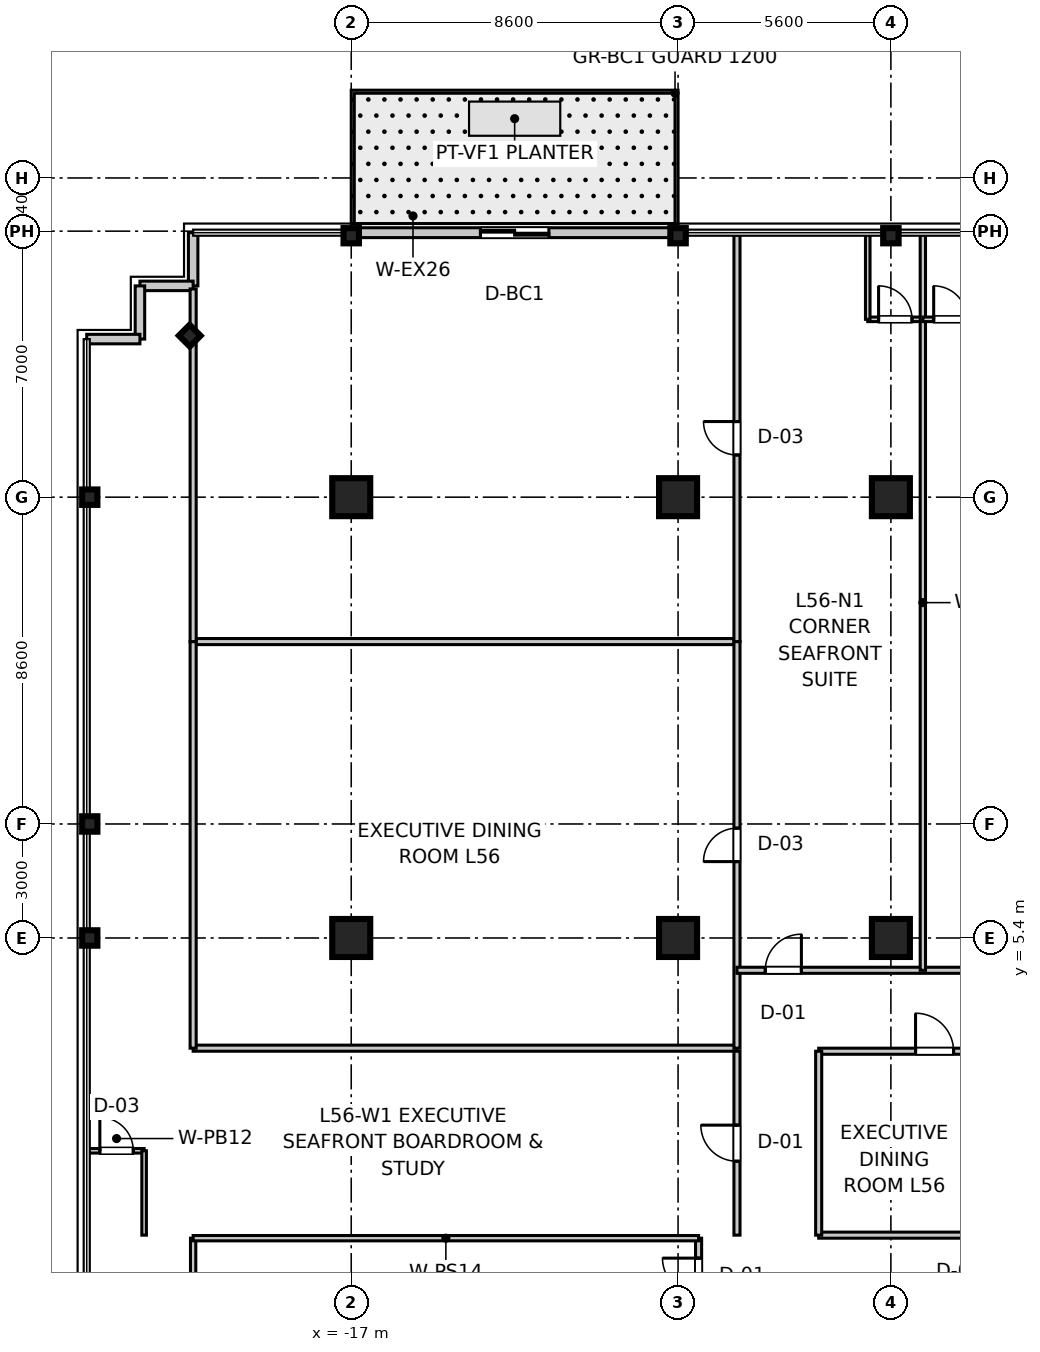
"""IFC4 building model, lengths in metres.
Left out: names, types, materials, properties, quantities, classifications, styles, units other than length and angle.
Written with IfcOpenShell. Run it as: python <this file> out.ifc"""

import sys

from ifc_helpers import new_model, si_unit, direction, frame, frame_2d, origin, origin_2d, place, context, subcontext, project, spatial, rectangle, i_section, extrude, source, transform, mapped, element, fill, save


model = new_model("IFC4")
c1 = context("Model", 3, precision=1e-05, world=origin(), true_north=direction((0.0, 1.0)))
c2 = subcontext(c1, "Body", "Model", "MODEL_VIEW")
j1 = project(units=[si_unit("LENGTHUNIT", "METRE"), si_unit("PLANEANGLEUNIT", "RADIAN")], contexts=[c1])
p1 = place(None, origin())
s1 = spatial("IfcSite", under=j1, at=p1, CompositionType="ELEMENT")
p2 = place(p1, origin())
s2 = spatial("IfcBuilding", under=s1, at=p2, CompositionType="ELEMENT")
p3 = place(p2, frame((0.0, 0.0, 219.7)))
s3 = spatial("IfcBuildingStorey", under=s2, at=p3, CompositionType="ELEMENT", Elevation=219.7)
m1 = source(origin(), c2, "Body", "SweptSolid", [
    extrude(rectangle(XDim=1.0, YDim=1.0, at=origin_2d()), origin(), (0.0, 0.0, 1.0), 3.655),
])
for number, where, z_axis, x_axis in (
    (1, (-17.0, 5.4, 0.0), (0.0, 0.0, 1.0), (1.0, 0.0, 0.0)),
    (2, (-17.0, 17.0, 0.0), (0.0, 0.0, 1.0), (1.0, 0.0, 0.0)),
    (3, (-8.4, 5.4, 0.0), (0.0, 0.0, 1.0), (1.0, 0.0, 0.0)),
    (4, (-8.4, 17.0, 0.0), (0.0, 0.0, 1.0), (1.0, 0.0, 0.0)),
    (5, (-2.8, 5.4, 0.0), (0.0, 0.0, 1.0), (1.0, 0.0, 0.0)),
    (6, (-2.8, 17.0, 0.0), (0.0, 0.0, 1.0), (1.0, 0.0, 0.0)),
):
    element("IfcColumn", number, at=place(p3, frame(where, z_axis=z_axis, x_axis=x_axis)), inside=s3, PredefinedType="COLUMN", context=c2, shape_type="MappedRepresentation", body=[
        mapped(m1, transform((0.0, 0.0, 0.0), scale=1.0)),
    ])
m2 = source(origin(), c2, "Body", "SweptSolid", [
    extrude(i_section(OverallWidth=0.401, OverallDepth=0.406, WebThickness=0.016, FlangeThickness=0.025, at=origin_2d()), origin(), (0.0, 0.0, 1.0), 3.655),
])
for number, where, z_axis, x_axis in (
    (7, (-23.88, 5.4, 0.0), (0.0, 0.0, 1.0), (1.0, 0.0, 0.0)),
    (8, (-23.88, 8.4, 0.0), (0.0, 0.0, 1.0), (1.0, 0.0, 0.0)),
    (9, (-23.88, 17.0, 0.0), (0.0, 0.0, 1.0), (1.0, 0.0, 0.0)),
    (10, (-17.0, 23.88, 0.0), (0.0, 0.0, 1.0), (0.0, 1.0, 0.0)),
    (11, (-8.4, 23.88, 0.0), (0.0, 0.0, 1.0), (0.0, 1.0, 0.0)),
    (12, (-2.8, 23.88, 0.0), (0.0, 0.0, 1.0), (0.0, 1.0, 0.0)),
    (13, (-21.25, 21.25, 0.0), (0.0, 0.0, 1.0), (0.707, 0.707, 0.0)),
):
    element("IfcColumn", number, at=place(p3, frame(where, z_axis=z_axis, x_axis=x_axis)), inside=s3, PredefinedType="COLUMN", context=c2, shape_type="MappedRepresentation", body=[
        mapped(m2, transform((0.0, 0.0, 0.0), scale=1.0)),
    ])
m3 = source(origin(), c2, "Body", "SweptSolid", [
    extrude(rectangle(XDim=1.4, YDim=0.25, at=frame_2d((0.7, 0.0))), origin(), (0.0, 0.0, 1.0), 3.41),
])
p4 = place(p3, frame((-21.16, 22.56, 0.0), z_axis=(0.0, 0.0, 1.0), x_axis=(0.0, 1.0, 0.0)))
e14 = element("IfcWall", 14, at=p4, inside=s3, PredefinedType="STANDARD", context=c2, shape_type="MappedRepresentation", body=[
    mapped(m3, transform((0.0, 0.0, 0.0), scale=1.0)),
])
m4 = source(origin(), c2, "Body", "SweptSolid", [
    extrude(rectangle(XDim=1.4, YDim=0.25, at=frame_2d((0.7, 0.0))), origin(), (0.0, 0.0, 1.0), 3.41),
])
for number, where, z_axis, x_axis in (
    (15, (-22.56, 22.56, 0.0), (0.0, 0.0, 1.0), (1.0, 0.0, 0.0)),
    (16, (-22.56, 21.16, 0.0), (0.0, 0.0, 1.0), (0.0, 1.0, 0.0)),
):
    element("IfcWall", number, at=place(p3, frame(where, z_axis=z_axis, x_axis=x_axis)), inside=s3, PredefinedType="STANDARD", context=c2, shape_type="MappedRepresentation", body=[
        mapped(m4, transform((0.0, 0.0, 0.0), scale=1.0)),
    ])
p5 = place(p3, frame((-23.96, 21.16, 0.0), z_axis=(0.0, 0.0, 1.0), x_axis=(1.0, 0.0, 0.0)))
e17 = element("IfcWall", 17, at=p5, inside=s3, PredefinedType="STANDARD", context=c2, shape_type="MappedRepresentation", body=[
    mapped(m3, transform((0.0, 0.0, 0.0), scale=1.0)),
])
m5 = source(origin(), c2, "Body", "SweptSolid", [
    extrude(rectangle(XDim=8.6, YDim=0.26, at=frame_2d((4.3, 0.0))), origin(), (0.0, 0.0, 1.0), 2.89),
])
p6 = place(p3, frame((-17.0, 23.96, 0.0), z_axis=(0.0, 0.0, 1.0), x_axis=(1.0, 0.0, 0.0)))
e18 = element("IfcWall", 18, at=p6, inside=s3, PredefinedType="STANDARD", context=c2, shape_type="MappedRepresentation", body=[
    mapped(m5, transform((0.0, 0.0, 0.0), scale=1.0)),
])
p7 = place(p6, frame((3.4, 0.0, 0.0)))
e19 = element("IfcOpeningElement", 19, at=p7, cuts=e18, PredefinedType="OPENING", context=c2, shape_type="SweptSolid", body=[
    extrude(rectangle(XDim=1.8, YDim=2.25, at=frame_2d((0.9, 1.125))), frame((0.0, 0.14, 0.0), z_axis=(0.0, -1.0, 0.0), x_axis=(1.0, 0.0, 0.0)), (0.0, 0.0, 1.0), 0.28),
])
m6 = source(origin(), c2, "Body", "SweptSolid", [
    extrude(rectangle(XDim=14.31, YDim=0.16, at=frame_2d((7.155, 0.0))), origin(), (0.0, 0.0, 1.0), 2.75),
])
for number, where, z_axis, x_axis in (
    (20, (-21.16, 2.5, 0.0), (0.0, 0.0, 1.0), (1.0, 0.0, 0.0)),
    (21, (-21.16, 13.2, 0.0), (0.0, 0.0, 1.0), (1.0, 0.0, 0.0)),
):
    element("IfcWall", number, at=place(p3, frame(where, z_axis=z_axis, x_axis=x_axis)), inside=s3, PredefinedType="PARTITIONING", context=c2, shape_type="MappedRepresentation", body=[
        mapped(m6, transform((0.0, 0.0, 0.0), scale=1.0)),
    ])
m7 = source(origin(), c2, "Body", "SweptSolid", [
    extrude(rectangle(XDim=10.7, YDim=0.16, at=frame_2d((5.35, 0.0))), origin(), (0.0, 0.0, 1.0), 2.75),
])
p8 = place(p3, frame((-21.16, 2.5, 0.0), z_axis=(0.0, 0.0, 1.0), x_axis=(0.0, 1.0, 0.0)))
e22 = element("IfcWall", 22, at=p8, inside=s3, PredefinedType="PARTITIONING", context=c2, shape_type="MappedRepresentation", body=[
    mapped(m7, transform((0.0, 0.0, 0.0), scale=1.0)),
])
p9 = place(p3, frame((-6.85, 2.5, 0.0), z_axis=(0.0, 0.0, 1.0), x_axis=(0.0, 1.0, 0.0)))
e23 = element("IfcWall", 23, at=p9, inside=s3, PredefinedType="PARTITIONING", context=c2, shape_type="MappedRepresentation", body=[
    mapped(m7, transform((0.0, 0.0, 0.0), scale=1.0)),
])
p10 = place(p9, frame((4.91, 0.0, 0.0)))
e24 = element("IfcOpeningElement", 24, at=p10, cuts=e23, PredefinedType="OPENING", context=c2, shape_type="SweptSolid", body=[
    extrude(rectangle(XDim=0.88, YDim=2.1, at=frame_2d((0.44, 1.05))), frame((0.0, 0.09, 0.0), z_axis=(0.0, -1.0, 0.0), x_axis=(1.0, 0.0, 0.0)), (0.0, 0.0, 1.0), 0.18),
])
m8 = source(origin(), c2, "Body", "SweptSolid", [
    extrude(rectangle(XDim=9.28, YDim=0.16, at=frame_2d((4.64, 0.0))), origin(), (0.0, 0.0, 1.0), 2.75),
])
p11 = place(p3, frame((-21.16, 13.2, 0.0), z_axis=(0.0, 0.0, 1.0), x_axis=(0.0, 1.0, 0.0)))
e25 = element("IfcWall", 25, at=p11, inside=s3, PredefinedType="PARTITIONING", context=c2, shape_type="MappedRepresentation", body=[
    mapped(m8, transform((0.0, 0.0, 0.0), scale=1.0)),
])
p12 = place(p3, frame((-6.85, 13.2, 0.0), z_axis=(0.0, 0.0, 1.0), x_axis=(0.0, 1.0, 0.0)))
e26 = element("IfcWall", 26, at=p12, inside=s3, PredefinedType="PARTITIONING", context=c2, shape_type="MappedRepresentation", body=[
    mapped(m7, transform((0.0, 0.0, 0.0), scale=1.0)),
])
p13 = place(p12, frame((4.91, 0.0, 0.0)))
e27 = element("IfcOpeningElement", 27, at=p13, cuts=e26, PredefinedType="OPENING", context=c2, shape_type="SweptSolid", body=[
    extrude(rectangle(XDim=0.88, YDim=2.1, at=frame_2d((0.44, 1.05))), frame((0.0, 0.09, 0.0), z_axis=(0.0, -1.0, 0.0), x_axis=(1.0, 0.0, 0.0)), (0.0, 0.0, 1.0), 0.18),
])
m9 = source(origin(), c2, "Body", "SweptSolid", [
    extrude(rectangle(XDim=10.19, YDim=0.16, at=frame_2d((5.095, 0.0))), origin(), (0.0, 0.0, 1.0), 2.75),
])
p14 = place(p3, frame((-6.85, 4.55, 0.0), z_axis=(0.0, 0.0, 1.0), x_axis=(1.0, 0.0, 0.0)))
e28 = element("IfcWall", 28, at=p14, inside=s3, PredefinedType="PARTITIONING", context=c2, shape_type="MappedRepresentation", body=[
    mapped(m9, transform((0.0, 0.0, 0.0), scale=1.0)),
])
p15 = place(p14, frame((0.745, 0.0, 0.0)))
e29 = element("IfcOpeningElement", 29, at=p15, cuts=e28, PredefinedType="OPENING", context=c2, shape_type="SweptSolid", body=[
    extrude(rectangle(XDim=0.95, YDim=2.1, at=frame_2d((0.475, 1.05))), frame((0.0, 0.09, 0.0), z_axis=(0.0, -1.0, 0.0), x_axis=(1.0, 0.0, 0.0)), (0.0, 0.0, 1.0), 0.18),
])
p16 = place(p14, frame((6.45, 0.0, 0.0)))
e30 = element("IfcOpeningElement", 30, at=p16, cuts=e28, PredefinedType="OPENING", context=c2, shape_type="SweptSolid", body=[
    extrude(rectangle(XDim=0.95, YDim=2.1, at=frame_2d((0.475, 1.05))), frame((0.0, 0.09, 0.0), z_axis=(0.0, -1.0, 0.0), x_axis=(1.0, 0.0, 0.0)), (0.0, 0.0, 1.0), 0.18),
])
m10 = source(origin(), c2, "Body", "SweptSolid", [
    extrude(rectangle(XDim=1.45, YDim=0.12, at=frame_2d((0.725, 0.0))), origin(), (0.0, 0.0, 1.0), 2.75),
])
p17 = place(p3, frame((-3.409, 21.68, 0.0), z_axis=(0.0, 0.0, 1.0), x_axis=(1.0, 0.0, 0.0)))
e31 = element("IfcWall", 31, at=p17, inside=s3, PredefinedType="PARTITIONING", context=c2, shape_type="MappedRepresentation", body=[
    mapped(m10, transform((0.0, 0.0, 0.0), scale=1.0)),
])
p18 = place(p17, frame((0.285, 0.0, 0.0)))
e32 = element("IfcOpeningElement", 32, at=p18, cuts=e31, PredefinedType="OPENING", context=c2, shape_type="SweptSolid", body=[
    extrude(rectangle(XDim=0.88, YDim=2.1, at=frame_2d((0.44, 1.05))), frame((0.0, 0.07, 0.0), z_axis=(0.0, -1.0, 0.0), x_axis=(1.0, 0.0, 0.0)), (0.0, 0.0, 1.0), 0.14),
])
m11 = source(origin(), c2, "Body", "SweptSolid", [
    extrude(rectangle(XDim=2.22, YDim=0.12, at=frame_2d((1.11, 0.0))), origin(), (0.0, 0.0, 1.0), 2.75),
])
p19 = place(p3, frame((-3.409, 21.68, 0.0), z_axis=(0.0, 0.0, 1.0), x_axis=(0.0, 1.0, 0.0)))
e33 = element("IfcWall", 33, at=p19, inside=s3, PredefinedType="PARTITIONING", context=c2, shape_type="MappedRepresentation", body=[
    mapped(m11, transform((0.0, 0.0, 0.0), scale=1.0)),
])
m12 = source(origin(), c2, "Body", "SweptSolid", [
    extrude(rectangle(XDim=19.35, YDim=0.14, at=frame_2d((9.675, 0.0))), origin(), (0.0, 0.0, 1.0), 2.75),
])
p20 = place(p3, frame((-1.959, 4.55, 0.0), z_axis=(0.0, 0.0, 1.0), x_axis=(0.0, 1.0, 0.0)))
e34 = element("IfcWall", 34, at=p20, inside=s3, PredefinedType="PARTITIONING", context=c2, shape_type="MappedRepresentation", body=[
    mapped(m12, transform((0.0, 0.0, 0.0), scale=1.0)),
])
p21 = place(p3, frame((-1.959, 21.68, 0.0), z_axis=(0.0, 0.0, 1.0), x_axis=(1.0, 0.0, 0.0)))
e35 = element("IfcWall", 35, at=p21, inside=s3, PredefinedType="PARTITIONING", context=c2, shape_type="MappedRepresentation", body=[
    mapped(m10, transform((0.0, 0.0, 0.0), scale=1.0)),
])
p22 = place(p21, frame((0.285, 0.0, 0.0)))
e36 = element("IfcOpeningElement", 36, at=p22, cuts=e35, PredefinedType="OPENING", context=c2, shape_type="SweptSolid", body=[
    extrude(rectangle(XDim=0.88, YDim=2.1, at=frame_2d((0.44, 1.05))), frame((0.0, 0.07, 0.0), z_axis=(0.0, -1.0, 0.0), x_axis=(1.0, 0.0, 0.0)), (0.0, 0.0, 1.0), 0.14),
])
m13 = source(origin(), c2, "Body", "SweptSolid", [
    extrude(rectangle(XDim=21.4, YDim=0.16, at=frame_2d((10.7, 0.0))), origin(), (0.0, 0.0, 1.0), 2.75),
])
p23 = place(p3, frame((-7.86, -23.9, 0.0), z_axis=(0.0, 0.0, 1.0), x_axis=(0.0, 1.0, 0.0)))
e37 = element("IfcWall", 37, at=p23, inside=s3, PredefinedType="PARTITIONING", context=c2, shape_type="MappedRepresentation", body=[
    mapped(m13, transform((0.0, 0.0, 0.0), scale=1.0)),
])
p24 = place(p23, frame((19.925, 0.0, 0.0)))
e38 = element("IfcOpeningElement", 38, at=p24, cuts=e37, PredefinedType="OPENING", context=c2, shape_type="SweptSolid", body=[
    extrude(rectangle(XDim=0.95, YDim=2.1, at=frame_2d((0.475, 1.05))), frame((0.0, 0.09, 0.0), z_axis=(0.0, -1.0, 0.0), x_axis=(1.0, 0.0, 0.0)), (0.0, 0.0, 1.0), 0.18),
])
m14 = source(origin(), c2, "Body", "SweptSolid", [
    extrude(rectangle(XDim=19.98, YDim=0.14, at=frame_2d((9.99, 0.0))), origin(), (0.0, 0.0, 1.0), 2.75),
])
p25 = place(p3, frame((-21.16, -22.48, 0.0), z_axis=(0.0, 0.0, 1.0), x_axis=(0.0, 1.0, 0.0)))
e39 = element("IfcWall", 39, at=p25, inside=s3, PredefinedType="PARTITIONING", context=c2, shape_type="MappedRepresentation", body=[
    mapped(m14, transform((0.0, 0.0, 0.0), scale=1.0)),
])
m15 = source(origin(), c2, "Body", "SweptSolid", [
    extrude(rectangle(XDim=13.3, YDim=0.14, at=frame_2d((6.65, 0.0))), origin(), (0.0, 0.0, 1.0), 2.75),
])
p26 = place(p3, frame((-21.16, -2.5, 0.0), z_axis=(0.0, 0.0, 1.0), x_axis=(1.0, 0.0, 0.0)))
e40 = element("IfcWall", 40, at=p26, inside=s3, PredefinedType="PARTITIONING", context=c2, shape_type="MappedRepresentation", body=[
    mapped(m15, transform((0.0, 0.0, 0.0), scale=1.0)),
])
m16 = source(origin(), c2, "Body", "SweptSolid", [
    extrude(rectangle(XDim=4.84, YDim=0.16, at=frame_2d((2.42, 0.0))), origin(), (0.0, 0.0, 1.0), 2.75),
])
p27 = place(p3, frame((-6.85, -2.42, 0.0), z_axis=(0.0, 0.0, 1.0), x_axis=(0.0, 1.0, 0.0)))
e41 = element("IfcWall", 41, at=p27, inside=s3, PredefinedType="PARTITIONING", context=c2, shape_type="MappedRepresentation", body=[
    mapped(m16, transform((0.0, 0.0, 0.0), scale=1.0)),
])
p28 = place(p27, frame((1.945, 0.0, 0.0)))
e42 = element("IfcOpeningElement", 42, at=p28, cuts=e41, PredefinedType="OPENING", context=c2, shape_type="SweptSolid", body=[
    extrude(rectangle(XDim=0.95, YDim=2.1, at=frame_2d((0.475, 1.05))), frame((0.0, 0.09, 0.0), z_axis=(0.0, -1.0, 0.0), x_axis=(1.0, 0.0, 0.0)), (0.0, 0.0, 1.0), 0.18),
])
p29 = place(p3, frame((-23.9, -0.2, 0.0), z_axis=(0.0, 0.0, 1.0), x_axis=(1.0, 0.0, 0.0)))
e43 = element("IfcWall", 43, at=p29, inside=s3, PredefinedType="PARTITIONING", context=c2, shape_type="MappedRepresentation", body=[
    mapped(m10, transform((0.0, 0.0, 0.0), scale=1.0)),
])
p30 = place(p29, frame((0.285, 0.0, 0.0)))
e44 = element("IfcOpeningElement", 44, at=p30, cuts=e43, PredefinedType="OPENING", context=c2, shape_type="SweptSolid", body=[
    extrude(rectangle(XDim=0.88, YDim=2.1, at=frame_2d((0.44, 1.05))), frame((0.0, 0.07, 0.0), z_axis=(0.0, -1.0, 0.0), x_axis=(1.0, 0.0, 0.0)), (0.0, 0.0, 1.0), 0.14),
])
p31 = place(p3, frame((-22.45, -2.42, 0.0), z_axis=(0.0, 0.0, 1.0), x_axis=(0.0, 1.0, 0.0)))
e45 = element("IfcWall", 45, at=p31, inside=s3, PredefinedType="PARTITIONING", context=c2, shape_type="MappedRepresentation", body=[
    mapped(m11, transform((0.0, 0.0, 0.0), scale=1.0)),
])
m17 = source(origin(), c2, "Body", "SweptSolid", [
    extrude(rectangle(XDim=3.977, YDim=0.16, at=frame_2d((1.989, 0.0))), origin(), (0.0, 0.0, 1.0), 2.75),
])
p32 = place(p3, frame((-4.7, -2.42, 0.0), z_axis=(0.0, 0.0, 1.0), x_axis=(1.0, 0.0, 0.0)))
e46 = element("IfcWall", 46, at=p32, inside=s3, PredefinedType="PARTITIONING", context=c2, shape_type="MappedRepresentation", body=[
    mapped(m17, transform((0.0, 0.0, 0.0), scale=1.0)),
])
p33 = place(p3, frame((-4.7, 2.42, 0.0), z_axis=(0.0, 0.0, 1.0), x_axis=(1.0, 0.0, 0.0)))
e47 = element("IfcWall", 47, at=p33, inside=s3, PredefinedType="PARTITIONING", context=c2, shape_type="MappedRepresentation", body=[
    mapped(m17, transform((0.0, 0.0, 0.0), scale=1.0)),
])
p34 = place(p33, frame((2.549, 0.0, 0.0)))
e48 = element("IfcOpeningElement", 48, at=p34, cuts=e47, PredefinedType="OPENING", context=c2, shape_type="SweptSolid", body=[
    extrude(rectangle(XDim=1.0, YDim=2.1, at=frame_2d((0.5, 1.05))), frame((0.0, 0.09, 0.0), z_axis=(0.0, -1.0, 0.0), x_axis=(1.0, 0.0, 0.0)), (0.0, 0.0, 1.0), 0.18),
])
p35 = place(p3, frame((-4.7, -2.42, 0.0), z_axis=(0.0, 0.0, 1.0), x_axis=(0.0, 1.0, 0.0)))
e49 = element("IfcWall", 49, at=p35, inside=s3, PredefinedType="PARTITIONING", context=c2, shape_type="MappedRepresentation", body=[
    mapped(m16, transform((0.0, 0.0, 0.0), scale=1.0)),
])
m18 = source(origin(), c2, "Body", "SweptSolid", [
    extrude(rectangle(XDim=0.88, YDim=2.1, at=frame_2d((0.44, 1.05))), frame((0.0, 0.025, 0.0), z_axis=(0.0, -1.0, 0.0), x_axis=(1.0, 0.0, 0.0)), (0.0, 0.0, 1.0), 0.05),
])
p36 = place(p10, origin())
e50 = element("IfcDoor", 50, at=p36, inside=s3, OperationType="SINGLE_SWING_LEFT", PredefinedType="DOOR", context=c2, shape_type="MappedRepresentation", body=[
    mapped(m18, transform((0.0, 0.0, 0.0), scale=1.0)),
])
fill(e24, e50)
p37 = place(p13, origin())
e51 = element("IfcDoor", 51, at=p37, inside=s3, OperationType="SINGLE_SWING_RIGHT", PredefinedType="DOOR", context=c2, shape_type="MappedRepresentation", body=[
    mapped(m18, transform((0.0, 0.0, 0.0), scale=1.0)),
])
fill(e27, e51)
p38 = place(p18, origin())
e52 = element("IfcDoor", 52, at=p38, inside=s3, OperationType="SINGLE_SWING_LEFT", PredefinedType="DOOR", context=c2, shape_type="MappedRepresentation", body=[
    mapped(m18, transform((0.0, 0.0, 0.0), scale=1.0)),
])
fill(e32, e52)
m19 = source(origin(), c2, "Body", "SweptSolid", [
    extrude(rectangle(XDim=0.95, YDim=2.1, at=frame_2d((0.475, 1.05))), frame((0.0, 0.025, 0.0), z_axis=(0.0, -1.0, 0.0), x_axis=(1.0, 0.0, 0.0)), (0.0, 0.0, 1.0), 0.05),
])
p39 = place(p15, origin())
e53 = element("IfcDoor", 53, at=p39, inside=s3, OperationType="SINGLE_SWING_RIGHT", PredefinedType="DOOR", context=c2, shape_type="MappedRepresentation", body=[
    mapped(m19, transform((0.0, 0.0, 0.0), scale=1.0)),
])
fill(e29, e53)
p40 = place(p22, origin())
e54 = element("IfcDoor", 54, at=p40, inside=s3, OperationType="SINGLE_SWING_LEFT", PredefinedType="DOOR", context=c2, shape_type="MappedRepresentation", body=[
    mapped(m18, transform((0.0, 0.0, 0.0), scale=1.0)),
])
fill(e36, e54)
p41 = place(p24, origin())
e55 = element("IfcDoor", 55, at=p41, inside=s3, OperationType="SINGLE_SWING_RIGHT", PredefinedType="DOOR", context=c2, shape_type="MappedRepresentation", body=[
    mapped(m19, transform((0.0, 0.0, 0.0), scale=1.0)),
])
fill(e38, e55)
p42 = place(p30, frame((0.88, 0.0, 0.0), z_axis=(0.0, 0.0, 1.0), x_axis=(-1.0, 0.0, 0.0)))
e56 = element("IfcDoor", 56, at=p42, inside=s3, OperationType="SINGLE_SWING_LEFT", PredefinedType="DOOR", context=c2, shape_type="MappedRepresentation", body=[
    mapped(m18, transform((0.0, 0.0, 0.0), scale=1.0)),
])
fill(e44, e56)
p43 = place(p28, origin())
e57 = element("IfcDoor", 57, at=p43, inside=s3, OperationType="SINGLE_SWING_RIGHT", PredefinedType="DOOR", context=c2, shape_type="MappedRepresentation", body=[
    mapped(m19, transform((0.0, 0.0, 0.0), scale=1.0)),
])
fill(e42, e57)
m20 = source(origin(), c2, "Body", "SweptSolid", [
    extrude(rectangle(XDim=1.0, YDim=2.1, at=frame_2d((0.5, 1.05))), frame((0.0, 0.025, 0.0), z_axis=(0.0, -1.0, 0.0), x_axis=(1.0, 0.0, 0.0)), (0.0, 0.0, 1.0), 0.05),
])
p44 = place(p34, frame((1.0, 0.0, 0.0), z_axis=(0.0, 0.0, 1.0), x_axis=(-1.0, 0.0, 0.0)))
e58 = element("IfcDoor", 58, at=p44, inside=s3, OperationType="SINGLE_SWING_LEFT", PredefinedType="DOOR", context=c2, shape_type="MappedRepresentation", body=[
    mapped(m20, transform((0.0, 0.0, 0.0), scale=1.0)),
])
fill(e48, e58)
m21 = source(origin(), c2, "Body", "SweptSolid", [
    extrude(rectangle(XDim=1.8, YDim=2.25, at=frame_2d((0.9, 1.125))), frame((0.0, 0.025, 0.0), z_axis=(0.0, -1.0, 0.0), x_axis=(1.0, 0.0, 0.0)), (0.0, 0.0, 1.0), 0.05),
])
p45 = place(p7, origin())
e59 = element("IfcDoor", 59, at=p45, inside=s3, OperationType="DOUBLE_DOOR_SLIDING", PredefinedType="DOOR", context=c2, shape_type="MappedRepresentation", body=[
    mapped(m21, transform((0.0, 0.0, 0.0), scale=1.0)),
])
fill(e19, e59)
save(model, sys.argv[1])
